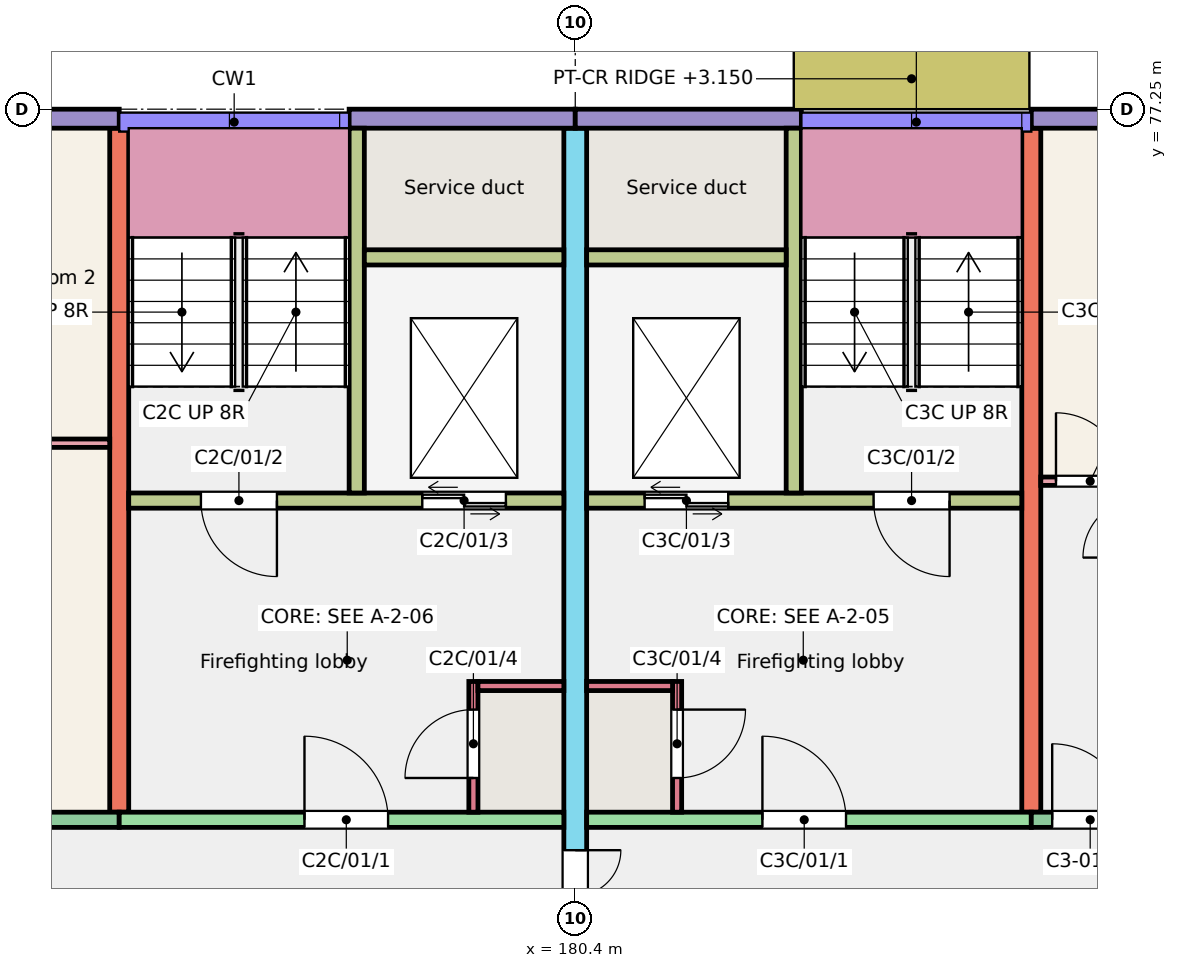
"""IFC4 building model, lengths in metres.
Left out: names, types, materials, properties, quantities, classifications, styles, units other than length and angle.
Written with IfcOpenShell. Run it as: python <this file> out.ifc"""

import sys

from ifc_helpers import new_model, si_unit, direction, frame, frame_2d, origin, place, context, subcontext, project, spatial, rectangle, extrude, element, fill, save


model = new_model("IFC4")
c1 = context("Model", 3, precision=1e-05, world=origin(), true_north=direction((0.0, 1.0)))
c2 = subcontext(c1, "Body", "Model", "MODEL_VIEW")
j1 = project(units=[si_unit("LENGTHUNIT", "METRE"), si_unit("PLANEANGLEUNIT", "RADIAN")], contexts=[c1])
p1 = place(None, origin())
s1 = spatial("IfcSite", under=j1, at=p1, CompositionType="ELEMENT")
p2 = place(p1, origin())
s2 = spatial("IfcBuilding", under=s1, at=p2, CompositionType="ELEMENT")
p3 = place(p2, frame((0.0, 0.0, 3.0)))
s3 = spatial("IfcBuildingStorey", under=s2, at=p3, CompositionType="ELEMENT", Elevation=3.0)
p4 = place(p3, frame((174.4, 68.0, 0.0), z_axis=(0.0, 0.0, 1.0), x_axis=(0.0, 1.0, 0.0)))
e1 = element("IfcWall", 1, at=p4, inside=s3, PredefinedType="SHEAR", context=c2, shape_type="SweptSolid", body=[
    extrude(rectangle(XDim=9.0, YDim=0.25, at=frame_2d((4.5, 0.0))), origin(), (0.0, 0.0, 1.0), 3.0),
])
p5 = place(p3, frame((180.4, 66.0, 0.0), z_axis=(0.0, 0.0, 1.0), x_axis=(0.0, 1.0, 0.0)))
e2 = element("IfcWall", 2, at=p5, inside=s3, PredefinedType="SHEAR", context=c2, shape_type="SweptSolid", body=[
    extrude(rectangle(XDim=11.0, YDim=0.3, at=frame_2d((5.5, 0.0))), origin(), (0.0, 0.0, 1.0), 3.0),
])
p6 = place(p5, frame((0.3, 0.0, 0.0)))
e3 = element("IfcOpeningElement", 3, at=p6, cuts=e2, PredefinedType="OPENING", context=c2, shape_type="SweptSolid", body=[
    extrude(rectangle(XDim=1.2, YDim=2.1, at=frame_2d((0.6, 1.05))), frame((0.0, 0.16, 0.0), z_axis=(0.0, -1.0, 0.0), x_axis=(1.0, 0.0, 0.0)), (0.0, 0.0, 1.0), 0.32),
])
p7 = place(p3, frame((186.4, 68.0, 0.0), z_axis=(0.0, 0.0, 1.0), x_axis=(0.0, 1.0, 0.0)))
e4 = element("IfcWall", 4, at=p7, inside=s3, PredefinedType="SHEAR", context=c2, shape_type="SweptSolid", body=[
    extrude(rectangle(XDim=9.0, YDim=0.25, at=frame_2d((4.5, 0.0))), origin(), (0.0, 0.0, 1.0), 3.0),
])
p8 = place(p3, frame((170.8, 77.125, 0.0), z_axis=(0.0, 0.0, 1.0), x_axis=(1.0, 0.0, 0.0)))
e5 = element("IfcWall", 5, at=p8, inside=s3, PredefinedType="SOLIDWALL", context=c2, shape_type="SweptSolid", body=[
    extrude(rectangle(XDim=3.6, YDim=0.25, at=frame_2d((1.8, 0.0))), origin(), (0.0, 0.0, 1.0), 3.0),
])
p9 = place(p8, frame((1.038, 0.0, 0.9)))
e6 = element("IfcOpeningElement", 6, at=p9, cuts=e5, PredefinedType="OPENING", context=c2, shape_type="SweptSolid", body=[
    extrude(rectangle(XDim=1.5, YDim=1.5, at=frame_2d((0.75, 0.75))), frame((0.0, 0.135, 0.0), z_axis=(0.0, -1.0, 0.0), x_axis=(1.0, 0.0, 0.0)), (0.0, 0.0, 1.0), 0.27),
])
p10 = place(p3, frame((170.8, 67.9, 0.0), z_axis=(0.0, 0.0, 1.0), x_axis=(1.0, 0.0, 0.0)))
e7 = element("IfcWall", 7, at=p10, inside=s3, PredefinedType="SOLIDWALL", context=c2, shape_type="SweptSolid", body=[
    extrude(rectangle(XDim=3.6, YDim=0.2, at=frame_2d((1.8, 0.0))), origin(), (0.0, 0.0, 1.0), 3.0),
])
p11 = place(p10, frame((1.038, 0.0, 0.9)))
e8 = element("IfcOpeningElement", 8, at=p11, cuts=e7, PredefinedType="OPENING", context=c2, shape_type="SweptSolid", body=[
    extrude(rectangle(XDim=1.5, YDim=1.5, at=frame_2d((0.75, 0.75))), frame((0.0, 0.11, 0.0), z_axis=(0.0, -1.0, 0.0), x_axis=(1.0, 0.0, 0.0)), (0.0, 0.0, 1.0), 0.22),
])
p12 = place(p3, frame((177.425, 77.125, 0.0), z_axis=(0.0, 0.0, 1.0), x_axis=(1.0, 0.0, 0.0)))
e9 = element("IfcWall", 9, at=p12, inside=s3, PredefinedType="SOLIDWALL", context=c2, shape_type="SweptSolid", body=[
    extrude(rectangle(XDim=2.975, YDim=0.25, at=frame_2d((1.487, 0.0))), origin(), (0.0, 0.0, 1.0), 3.0),
])
p13 = place(p3, frame((174.4, 67.9, 0.0), z_axis=(0.0, 0.0, 1.0), x_axis=(1.0, 0.0, 0.0)))
e10 = element("IfcWall", 10, at=p13, inside=s3, PredefinedType="SHEAR", context=c2, shape_type="SweptSolid", body=[
    extrude(rectangle(XDim=5.85, YDim=0.2, at=frame_2d((2.925, 0.0))), origin(), (0.0, 0.0, 1.0), 3.0),
])
p14 = place(p13, frame((2.438, 0.0, 0.0)))
e11 = element("IfcOpeningElement", 11, at=p14, cuts=e10, PredefinedType="OPENING", context=c2, shape_type="SweptSolid", body=[
    extrude(rectangle(XDim=1.1, YDim=2.1, at=frame_2d((0.55, 1.05))), frame((0.0, 0.11, 0.0), z_axis=(0.0, -1.0, 0.0), x_axis=(1.0, 0.0, 0.0)), (0.0, 0.0, 1.0), 0.22),
])
p15 = place(p3, frame((174.525, 72.1, 0.0), z_axis=(0.0, 0.0, 1.0), x_axis=(1.0, 0.0, 0.0)))
e12 = element("IfcWall", 12, at=p15, inside=s3, PredefinedType="SHEAR", context=c2, shape_type="SweptSolid", body=[
    extrude(rectangle(XDim=5.725, YDim=0.2, at=frame_2d((2.863, 0.0))), origin(), (0.0, 0.0, 1.0), 3.0),
])
p16 = place(p15, frame((0.95, 0.0, 0.0)))
e13 = element("IfcOpeningElement", 13, at=p16, cuts=e12, PredefinedType="OPENING", context=c2, shape_type="SweptSolid", body=[
    extrude(rectangle(XDim=1.0, YDim=2.1, at=frame_2d((0.5, 1.05))), frame((0.0, 0.11, 0.0), z_axis=(0.0, -1.0, 0.0), x_axis=(1.0, 0.0, 0.0)), (0.0, 0.0, 1.0), 0.22),
])
p17 = place(p15, frame((3.863, 0.0, 0.0)))
e14 = element("IfcOpeningElement", 14, at=p17, cuts=e12, PredefinedType="OPENING", context=c2, shape_type="SweptSolid", body=[
    extrude(rectangle(XDim=1.1, YDim=2.1, at=frame_2d((0.55, 1.05))), frame((0.0, 0.11, 0.0), z_axis=(0.0, -1.0, 0.0), x_axis=(1.0, 0.0, 0.0)), (0.0, 0.0, 1.0), 0.22),
])
p18 = place(p3, frame((177.525, 72.2, 0.0), z_axis=(0.0, 0.0, 1.0), x_axis=(0.0, 1.0, 0.0)))
e15 = element("IfcWall", 15, at=p18, inside=s3, PredefinedType="SHEAR", context=c2, shape_type="SweptSolid", body=[
    extrude(rectangle(XDim=4.8, YDim=0.2, at=frame_2d((2.4, 0.0))), origin(), (0.0, 0.0, 1.0), 3.0),
])
p19 = place(p3, frame((177.625, 75.3, 0.0), z_axis=(0.0, 0.0, 1.0), x_axis=(1.0, 0.0, 0.0)))
e16 = element("IfcWall", 16, at=p19, inside=s3, PredefinedType="SHEAR", context=c2, shape_type="SweptSolid", body=[
    extrude(rectangle(XDim=2.625, YDim=0.2, at=frame_2d((1.312, 0.0))), origin(), (0.0, 0.0, 1.0), 3.0),
])
p20 = place(p3, frame((179.06, 68.0, 0.0), z_axis=(0.0, 0.0, 1.0), x_axis=(0.0, 1.0, 0.0)))
e17 = element("IfcWall", 17, at=p20, inside=s3, PredefinedType="SHEAR", context=c2, shape_type="SweptSolid", body=[
    extrude(rectangle(XDim=1.72, YDim=0.12, at=frame_2d((0.86, 0.0))), origin(), (0.0, 0.0, 1.0), 3.0),
])
p21 = place(p20, frame((0.45, 0.0, 0.0)))
e18 = element("IfcOpeningElement", 18, at=p21, cuts=e17, PredefinedType="OPENING", context=c2, shape_type="SweptSolid", body=[
    extrude(rectangle(XDim=0.9, YDim=2.1, at=frame_2d((0.45, 1.05))), frame((0.0, 0.07, 0.0), z_axis=(0.0, -1.0, 0.0), x_axis=(1.0, 0.0, 0.0)), (0.0, 0.0, 1.0), 0.14),
])
p22 = place(p3, frame((179.12, 69.66, 0.0), z_axis=(0.0, 0.0, 1.0), x_axis=(1.0, 0.0, 0.0)))
e19 = element("IfcWall", 19, at=p22, inside=s3, PredefinedType="SHEAR", context=c2, shape_type="SweptSolid", body=[
    extrude(rectangle(XDim=1.13, YDim=0.12, at=frame_2d((0.565, 0.0))), origin(), (0.0, 0.0, 1.0), 3.0),
])
p23 = place(p3, frame((180.4, 77.125, 0.0), z_axis=(0.0, 0.0, 1.0), x_axis=(1.0, 0.0, 0.0)))
e20 = element("IfcWall", 20, at=p23, inside=s3, PredefinedType="SOLIDWALL", context=c2, shape_type="SweptSolid", body=[
    extrude(rectangle(XDim=2.975, YDim=0.25, at=frame_2d((1.488, 0.0))), origin(), (0.0, 0.0, 1.0), 3.0),
])
p24 = place(p3, frame((180.55, 67.9, 0.0), z_axis=(0.0, 0.0, 1.0), x_axis=(1.0, 0.0, 0.0)))
e21 = element("IfcWall", 21, at=p24, inside=s3, PredefinedType="SHEAR", context=c2, shape_type="SweptSolid", body=[
    extrude(rectangle(XDim=5.85, YDim=0.2, at=frame_2d((2.925, 0.0))), origin(), (0.0, 0.0, 1.0), 3.0),
])
p25 = place(p24, frame((2.312, 0.0, 0.0)))
e22 = element("IfcOpeningElement", 22, at=p25, cuts=e21, PredefinedType="OPENING", context=c2, shape_type="SweptSolid", body=[
    extrude(rectangle(XDim=1.1, YDim=2.1, at=frame_2d((0.55, 1.05))), frame((0.0, 0.11, 0.0), z_axis=(0.0, -1.0, 0.0), x_axis=(1.0, 0.0, 0.0)), (0.0, 0.0, 1.0), 0.22),
])
p26 = place(p3, frame((180.55, 72.1, 0.0), z_axis=(0.0, 0.0, 1.0), x_axis=(1.0, 0.0, 0.0)))
e23 = element("IfcWall", 23, at=p26, inside=s3, PredefinedType="SHEAR", context=c2, shape_type="SweptSolid", body=[
    extrude(rectangle(XDim=5.725, YDim=0.2, at=frame_2d((2.862, 0.0))), origin(), (0.0, 0.0, 1.0), 3.0),
])
p27 = place(p26, frame((3.775, 0.0, 0.0)))
e24 = element("IfcOpeningElement", 24, at=p27, cuts=e23, PredefinedType="OPENING", context=c2, shape_type="SweptSolid", body=[
    extrude(rectangle(XDim=1.0, YDim=2.1, at=frame_2d((0.5, 1.05))), frame((0.0, 0.11, 0.0), z_axis=(0.0, -1.0, 0.0), x_axis=(1.0, 0.0, 0.0)), (0.0, 0.0, 1.0), 0.22),
])
p28 = place(p26, frame((0.762, 0.0, 0.0)))
e25 = element("IfcOpeningElement", 25, at=p28, cuts=e23, PredefinedType="OPENING", context=c2, shape_type="SweptSolid", body=[
    extrude(rectangle(XDim=1.1, YDim=2.1, at=frame_2d((0.55, 1.05))), frame((0.0, 0.11, 0.0), z_axis=(0.0, -1.0, 0.0), x_axis=(1.0, 0.0, 0.0)), (0.0, 0.0, 1.0), 0.22),
])
p29 = place(p3, frame((183.275, 72.2, 0.0), z_axis=(0.0, 0.0, 1.0), x_axis=(0.0, 1.0, 0.0)))
e26 = element("IfcWall", 26, at=p29, inside=s3, PredefinedType="SHEAR", context=c2, shape_type="SweptSolid", body=[
    extrude(rectangle(XDim=4.8, YDim=0.2, at=frame_2d((2.4, 0.0))), origin(), (0.0, 0.0, 1.0), 3.0),
])
p30 = place(p3, frame((180.55, 75.3, 0.0), z_axis=(0.0, 0.0, 1.0), x_axis=(1.0, 0.0, 0.0)))
e27 = element("IfcWall", 27, at=p30, inside=s3, PredefinedType="SHEAR", context=c2, shape_type="SweptSolid", body=[
    extrude(rectangle(XDim=2.625, YDim=0.2, at=frame_2d((1.312, 0.0))), origin(), (0.0, 0.0, 1.0), 3.0),
])
p31 = place(p3, frame((181.74, 68.0, 0.0), z_axis=(0.0, 0.0, 1.0), x_axis=(0.0, 1.0, 0.0)))
e28 = element("IfcWall", 28, at=p31, inside=s3, PredefinedType="SHEAR", context=c2, shape_type="SweptSolid", body=[
    extrude(rectangle(XDim=1.72, YDim=0.12, at=frame_2d((0.86, 0.0))), origin(), (0.0, 0.0, 1.0), 3.0),
])
p32 = place(p31, frame((0.45, 0.0, 0.0)))
e29 = element("IfcOpeningElement", 29, at=p32, cuts=e28, PredefinedType="OPENING", context=c2, shape_type="SweptSolid", body=[
    extrude(rectangle(XDim=0.9, YDim=2.1, at=frame_2d((0.45, 1.05))), frame((0.0, 0.07, 0.0), z_axis=(0.0, -1.0, 0.0), x_axis=(1.0, 0.0, 0.0)), (0.0, 0.0, 1.0), 0.14),
])
p33 = place(p3, frame((180.55, 69.66, 0.0), z_axis=(0.0, 0.0, 1.0), x_axis=(1.0, 0.0, 0.0)))
e30 = element("IfcWall", 30, at=p33, inside=s3, PredefinedType="SHEAR", context=c2, shape_type="SweptSolid", body=[
    extrude(rectangle(XDim=1.13, YDim=0.12, at=frame_2d((0.565, 0.0))), origin(), (0.0, 0.0, 1.0), 3.0),
])
p34 = place(p3, frame((186.4, 77.125, 0.0), z_axis=(0.0, 0.0, 1.0), x_axis=(1.0, 0.0, 0.0)))
e31 = element("IfcWall", 31, at=p34, inside=s3, PredefinedType="SOLIDWALL", context=c2, shape_type="SweptSolid", body=[
    extrude(rectangle(XDim=3.6, YDim=0.25, at=frame_2d((1.8, 0.0))), origin(), (0.0, 0.0, 1.0), 3.0),
])
p35 = place(p34, frame((1.05, 0.0, 0.9)))
e32 = element("IfcOpeningElement", 32, at=p35, cuts=e31, PredefinedType="OPENING", context=c2, shape_type="SweptSolid", body=[
    extrude(rectangle(XDim=1.5, YDim=1.5, at=frame_2d((0.75, 0.75))), frame((0.0, 0.135, 0.0), z_axis=(0.0, -1.0, 0.0), x_axis=(1.0, 0.0, 0.0)), (0.0, 0.0, 1.0), 0.27),
])
p36 = place(p3, frame((186.4, 67.9, 0.0), z_axis=(0.0, 0.0, 1.0), x_axis=(1.0, 0.0, 0.0)))
e33 = element("IfcWall", 33, at=p36, inside=s3, PredefinedType="SOLIDWALL", context=c2, shape_type="SweptSolid", body=[
    extrude(rectangle(XDim=3.6, YDim=0.2, at=frame_2d((1.8, 0.0))), origin(), (0.0, 0.0, 1.0), 3.0),
])
p37 = place(p36, frame((1.905, 0.0, 1.1)))
e34 = element("IfcOpeningElement", 34, at=p37, cuts=e33, PredefinedType="OPENING", context=c2, shape_type="SweptSolid", body=[
    extrude(rectangle(XDim=1.2, YDim=1.3, at=frame_2d((0.6, 0.65))), frame((0.0, 0.11, 0.0), z_axis=(0.0, -1.0, 0.0), x_axis=(1.0, 0.0, 0.0)), (0.0, 0.0, 1.0), 0.22),
])
p38 = place(p36, frame((0.275, 0.0, 0.0)))
e35 = element("IfcOpeningElement", 35, at=p38, cuts=e33, PredefinedType="OPENING", context=c2, shape_type="SweptSolid", body=[
    extrude(rectangle(XDim=1.0, YDim=2.1, at=frame_2d((0.5, 1.05))), frame((0.0, 0.11, 0.0), z_axis=(0.0, -1.0, 0.0), x_axis=(1.0, 0.0, 0.0)), (0.0, 0.0, 1.0), 0.22),
])
p39 = place(p3, frame((170.9, 72.855, 0.0), z_axis=(0.0, 0.0, 1.0), x_axis=(1.0, 0.0, 0.0)))
e36 = element("IfcWall", 36, at=p39, inside=s3, PredefinedType="PARTITIONING", context=c2, shape_type="SweptSolid", body=[
    extrude(rectangle(XDim=3.375, YDim=0.11, at=frame_2d((1.688, 0.0))), origin(), (0.0, 0.0, 1.0), 2.8),
])
p40 = place(p3, frame((186.525, 72.355, 0.0), z_axis=(0.0, 0.0, 1.0), x_axis=(1.0, 0.0, 0.0)))
e37 = element("IfcWall", 37, at=p40, inside=s3, PredefinedType="PARTITIONING", context=c2, shape_type="SweptSolid", body=[
    extrude(rectangle(XDim=3.35, YDim=0.11, at=frame_2d((1.675, 0.0))), origin(), (0.0, 0.0, 1.0), 2.8),
])
p41 = place(p40, frame((0.2, 0.0, 0.0)))
e38 = element("IfcOpeningElement", 38, at=p41, cuts=e37, PredefinedType="OPENING", context=c2, shape_type="SweptSolid", body=[
    extrude(rectangle(XDim=0.9, YDim=2.1, at=frame_2d((0.45, 1.05))), frame((0.0, 0.065, 0.0), z_axis=(0.0, -1.0, 0.0), x_axis=(1.0, 0.0, 0.0)), (0.0, 0.0, 1.0), 0.13),
])
p42 = place(p38, origin())
e39 = element("IfcDoor", 39, at=p42, inside=s3, OperationType="SINGLE_SWING_LEFT", PredefinedType="DOOR", context=c2, shape_type="SweptSolid", body=[
    extrude(rectangle(XDim=1.0, YDim=2.1, at=frame_2d((0.5, 1.05))), frame((0.0, 0.025, 0.0), z_axis=(0.0, -1.0, 0.0), x_axis=(1.0, 0.0, 0.0)), (0.0, 0.0, 1.0), 0.05),
])
fill(e35, e39)
p43 = place(p41, origin())
e40 = element("IfcDoor", 40, at=p43, inside=s3, OperationType="SINGLE_SWING_LEFT", PredefinedType="DOOR", context=c2, shape_type="SweptSolid", body=[
    extrude(rectangle(XDim=0.9, YDim=2.1, at=frame_2d((0.45, 1.05))), frame((0.0, 0.025, 0.0), z_axis=(0.0, -1.0, 0.0), x_axis=(1.0, 0.0, 0.0)), (0.0, 0.0, 1.0), 0.05),
])
fill(e38, e40)
p44 = place(p14, origin())
e41 = element("IfcDoor", 41, at=p44, inside=s3, OperationType="SINGLE_SWING_LEFT", PredefinedType="DOOR", context=c2, shape_type="SweptSolid", body=[
    extrude(rectangle(XDim=1.1, YDim=2.1, at=frame_2d((0.55, 1.05))), frame((0.0, 0.025, 0.0), z_axis=(0.0, -1.0, 0.0), x_axis=(1.0, 0.0, 0.0)), (0.0, 0.0, 1.0), 0.05),
])
fill(e11, e41)
p45 = place(p16, origin())
e42 = element("IfcDoor", 42, at=p45, inside=s3, OperationType="SINGLE_SWING_RIGHT", PredefinedType="DOOR", context=c2, shape_type="SweptSolid", body=[
    extrude(rectangle(XDim=1.0, YDim=2.1, at=frame_2d((0.5, 1.05))), frame((0.0, 0.025, 0.0), z_axis=(0.0, -1.0, 0.0), x_axis=(1.0, 0.0, 0.0)), (0.0, 0.0, 1.0), 0.05),
])
fill(e13, e42)
p46 = place(p17, origin())
e43 = element("IfcDoor", 43, at=p46, inside=s3, OperationType="DOUBLE_DOOR_SLIDING", PredefinedType="DOOR", context=c2, shape_type="SweptSolid", body=[
    extrude(rectangle(XDim=1.1, YDim=2.1, at=frame_2d((0.55, 1.05))), frame((0.0, 0.025, 0.0), z_axis=(0.0, -1.0, 0.0), x_axis=(1.0, 0.0, 0.0)), (0.0, 0.0, 1.0), 0.05),
])
fill(e14, e43)
p47 = place(p21, origin())
e44 = element("IfcDoor", 44, at=p47, inside=s3, OperationType="SINGLE_SWING_LEFT", PredefinedType="DOOR", context=c2, shape_type="SweptSolid", body=[
    extrude(rectangle(XDim=0.9, YDim=2.1, at=frame_2d((0.45, 1.05))), frame((0.0, 0.025, 0.0), z_axis=(0.0, -1.0, 0.0), x_axis=(1.0, 0.0, 0.0)), (0.0, 0.0, 1.0), 0.05),
])
fill(e18, e44)
p48 = place(p25, origin())
e45 = element("IfcDoor", 45, at=p48, inside=s3, OperationType="SINGLE_SWING_LEFT", PredefinedType="DOOR", context=c2, shape_type="SweptSolid", body=[
    extrude(rectangle(XDim=1.1, YDim=2.1, at=frame_2d((0.55, 1.05))), frame((0.0, 0.025, 0.0), z_axis=(0.0, -1.0, 0.0), x_axis=(1.0, 0.0, 0.0)), (0.0, 0.0, 1.0), 0.05),
])
fill(e22, e45)
p49 = place(p27, origin())
e46 = element("IfcDoor", 46, at=p49, inside=s3, OperationType="SINGLE_SWING_RIGHT", PredefinedType="DOOR", context=c2, shape_type="SweptSolid", body=[
    extrude(rectangle(XDim=1.0, YDim=2.1, at=frame_2d((0.5, 1.05))), frame((0.0, 0.025, 0.0), z_axis=(0.0, -1.0, 0.0), x_axis=(1.0, 0.0, 0.0)), (0.0, 0.0, 1.0), 0.05),
])
fill(e24, e46)
p50 = place(p28, origin())
e47 = element("IfcDoor", 47, at=p50, inside=s3, OperationType="DOUBLE_DOOR_SLIDING", PredefinedType="DOOR", context=c2, shape_type="SweptSolid", body=[
    extrude(rectangle(XDim=1.1, YDim=2.1, at=frame_2d((0.55, 1.05))), frame((0.0, 0.025, 0.0), z_axis=(0.0, -1.0, 0.0), x_axis=(1.0, 0.0, 0.0)), (0.0, 0.0, 1.0), 0.05),
])
fill(e25, e47)
p51 = place(p32, origin())
e48 = element("IfcDoor", 48, at=p51, inside=s3, OperationType="SINGLE_SWING_RIGHT", PredefinedType="DOOR", context=c2, shape_type="SweptSolid", body=[
    extrude(rectangle(XDim=0.9, YDim=2.1, at=frame_2d((0.45, 1.05))), frame((0.0, 0.025, 0.0), z_axis=(0.0, -1.0, 0.0), x_axis=(1.0, 0.0, 0.0)), (0.0, 0.0, 1.0), 0.05),
])
fill(e29, e48)
p52 = place(p6, origin())
e49 = element("IfcDoor", 49, at=p52, inside=s3, OperationType="DOUBLE_DOOR_SINGLE_SWING", PredefinedType="DOOR", context=c2, shape_type="SweptSolid", body=[
    extrude(rectangle(XDim=1.2, YDim=2.1, at=frame_2d((0.6, 1.05))), frame((0.0, 0.025, 0.0), z_axis=(0.0, -1.0, 0.0), x_axis=(1.0, 0.0, 0.0)), (0.0, 0.0, 1.0), 0.05),
])
fill(e3, e49)
save(model, sys.argv[1])
